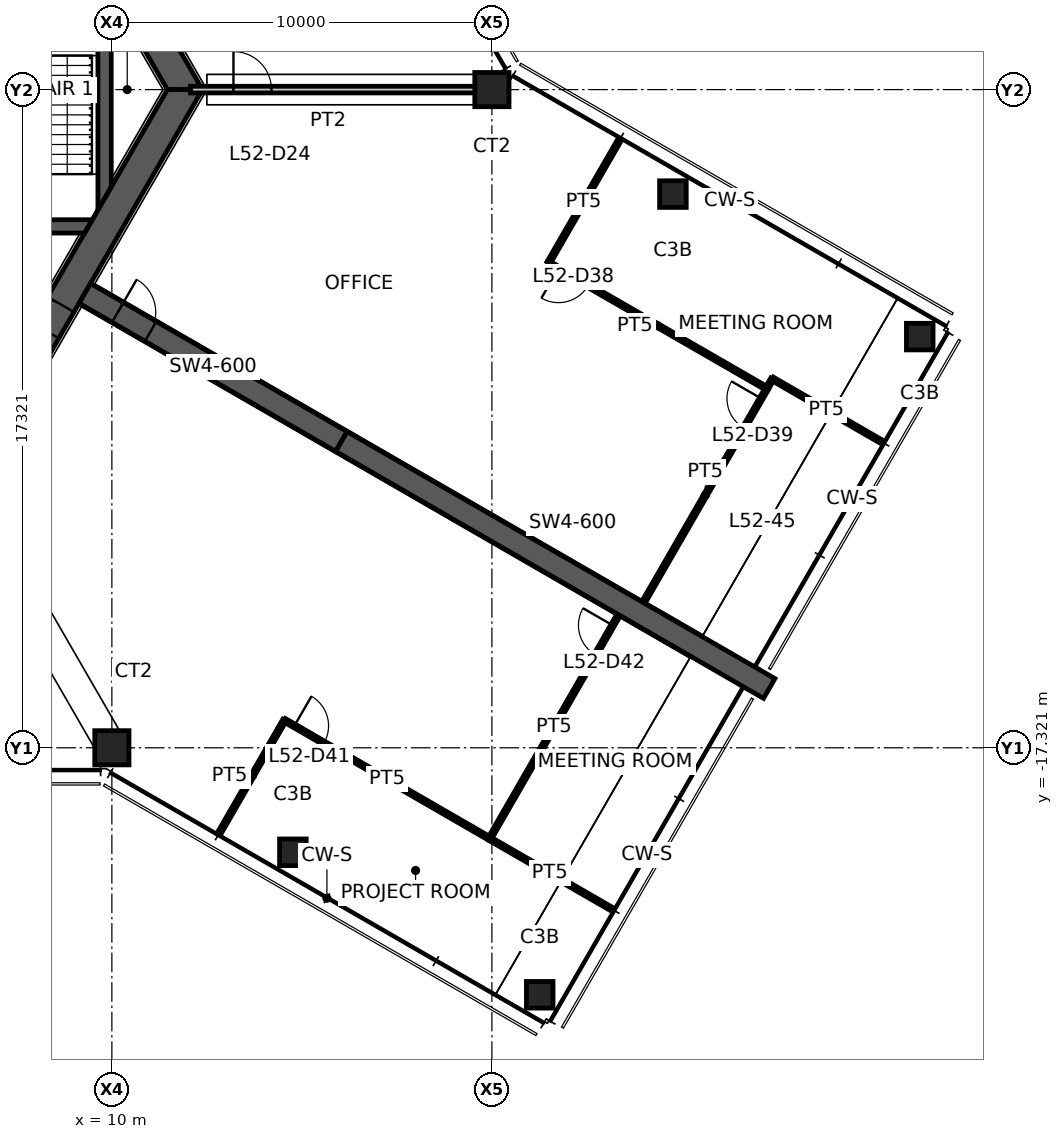
"""IFC4 building model, lengths in metres.
Left out: names, types, materials, properties, quantities, classifications, styles, units other than length and angle.
Written with IfcOpenShell. Run it as: python <this file> out.ifc"""

import sys

from ifc_helpers import new_model, si_unit, direction, frame, frame_2d, origin, origin_2d, place, context, subcontext, project, spatial, polyline, rectangle, hollow_rectangle, outline, extrude, element, fill, save


model = new_model("IFC4")
c1 = context("Model", 3, precision=1e-05, world=origin(), true_north=direction((0.0, 1.0)))
c2 = subcontext(c1, "Body", "Model", "MODEL_VIEW")
j1 = project(units=[si_unit("LENGTHUNIT", "METRE"), si_unit("PLANEANGLEUNIT", "RADIAN")], contexts=[c1])
p1 = place(None, origin())
s1 = spatial("IfcSite", under=j1, at=p1, CompositionType="ELEMENT")
p2 = place(p1, origin())
s2 = spatial("IfcBuilding", under=s1, at=p2, CompositionType="ELEMENT")
p3 = place(p2, frame((0.0, 0.0, 208.3)))
s3 = spatial("IfcBuildingStorey", under=s2, at=p3, CompositionType="ELEMENT", Elevation=208.3)
for number, where, z_axis, x_axis in (
    (1, (20.0, 0.0, 0.0), (0.0, 0.0, 1.0), (1.0, 0.0, 0.0)),
    (2, (10.0, -17.321, 0.0), (0.0, 0.0, 1.0), (1.0, 0.0, 0.0)),
):
    element("IfcColumn", number, at=place(p3, frame(where, z_axis=z_axis, x_axis=x_axis)), inside=s3, PredefinedType="COLUMN", context=c2, shape_type="SweptSolid", body=[
        extrude(hollow_rectangle(XDim=0.9, YDim=0.9, WallThickness=0.09, at=origin_2d()), origin(), (0.0, 0.0, 1.0), 4.5),
    ])
for number, where, z_axis, x_axis in (
    (3, (14.763, -20.071, 0.0), (0.0, 0.0, 1.0), (1.0, 0.0, 0.0)),
    (4, (21.258, -23.821, 0.0), (0.0, 0.0, 1.0), (1.0, 0.0, 0.0)),
    (5, (24.763, -2.75, 0.0), (0.0, 0.0, 1.0), (1.0, 0.0, 0.0)),
    (6, (31.258, -6.5, 0.0), (0.0, 0.0, 1.0), (1.0, 0.0, 0.0)),
):
    element("IfcColumn", number, at=place(p3, frame(where, z_axis=z_axis, x_axis=x_axis)), inside=s3, PredefinedType="COLUMN", context=c2, shape_type="SweptSolid", body=[
        extrude(hollow_rectangle(XDim=0.7, YDim=0.7, WallThickness=0.036, at=origin_2d()), origin(), (0.0, 0.0, 1.0), 4.5),
    ])
p4 = place(p3, frame((11.922, 0.0, 0.0), z_axis=(0.0, 0.0, 1.0), x_axis=(-0.500004296715, 0.866022923061, 0.0)))
e7 = element("IfcWall", 7, at=p4, inside=s3, PredefinedType="SHEAR", context=c2, shape_type="SweptSolid", body=[
    extrude(outline(polyline([(-0.231, -0.4), (5.835, -0.4), (6.635, -0.4), (12.153, -0.4), (11.691, 0.4), (6.635, 0.4), (5.835, 0.4), (0.231, 0.4), (-0.231, -0.4)])), origin(), (0.0, 0.0, 1.0), 4.5),
])
p5 = place(p4, frame((5.835, 0.0, 0.0)))
e8 = element("IfcOpeningElement", 8, at=p5, cuts=e7, PredefinedType="OPENING", context=c2, shape_type="SweptSolid", body=[
    extrude(rectangle(XDim=0.8, YDim=2.1, at=frame_2d((0.4, 1.05))), frame((0.0, 0.41, 0.0), z_axis=(0.0, -1.0, 0.0), x_axis=(1.0, 0.0, 0.0)), (0.0, 0.0, 1.0), 0.82),
])
p6 = place(p3, frame((5.961, -10.325, 0.0), z_axis=(0.0, 0.0, 1.0), x_axis=(0.500004296715, 0.866022923061, 0.0)))
e9 = element("IfcWall", 9, at=p6, inside=s3, PredefinedType="SHEAR", context=c2, shape_type="SweptSolid", body=[
    extrude(outline(polyline([(-0.231, -0.4), (4.594, -0.4), (5.394, -0.4), (12.153, -0.4), (11.691, 0.4), (5.394, 0.4), (4.594, 0.4), (0.231, 0.4), (-0.231, -0.4)])), origin(), (0.0, 0.0, 1.0), 4.5),
])
p7 = place(p6, frame((4.594, 0.0, 0.0)))
e10 = element("IfcOpeningElement", 10, at=p7, cuts=e9, PredefinedType="OPENING", context=c2, shape_type="SweptSolid", body=[
    extrude(rectangle(XDim=0.8, YDim=2.1, at=frame_2d((0.4, 1.05))), frame((0.0, 0.41, 0.0), z_axis=(0.0, -1.0, 0.0), x_axis=(1.0, 0.0, 0.0)), (0.0, 0.0, 1.0), 0.82),
])
p8 = place(p3, frame((9.288, -5.363, 0.0), z_axis=(0.0, 0.0, 1.0), x_axis=(0.866031736626, -0.499989031036, 0.0)))
e11 = element("IfcWall", 11, at=p8, inside=s3, PredefinedType="SHEAR", context=c2, shape_type="SweptSolid", body=[
    extrude(rectangle(XDim=7.796, YDim=0.6, at=frame_2d((3.898, 0.0))), origin(), (0.0, 0.0, 1.0), 4.5),
])
p9 = place(p8, frame((1.0, 0.0, 0.0)))
e12 = element("IfcOpeningElement", 12, at=p9, cuts=e11, PredefinedType="OPENING", context=c2, shape_type="SweptSolid", body=[
    extrude(rectangle(XDim=1.0, YDim=2.1, at=frame_2d((0.5, 1.05))), frame((0.0, 0.31, 0.0), z_axis=(0.0, -1.0, 0.0), x_axis=(1.0, 0.0, 0.0)), (0.0, 0.0, 1.0), 0.62),
])
p10 = place(p3, frame((16.039, -9.26, 0.0), z_axis=(0.0, 0.0, 1.0), x_axis=(0.866024837091, -0.50000098154, 0.0)))
e13 = element("IfcWall", 13, at=p10, inside=s3, PredefinedType="SHEAR", context=c2, shape_type="SweptSolid", body=[
    extrude(rectangle(XDim=13.0, YDim=0.6, at=frame_2d((6.5, 0.0))), origin(), (0.0, 0.0, 1.0), 4.5),
])
p11 = place(p3, frame((1.425, -3.6, 0.0), z_axis=(0.0, 0.0, 1.0), x_axis=(1.0, 0.0, 0.0)))
e14 = element("IfcWall", 14, at=p11, inside=s3, PredefinedType="SHEAR", context=c2, shape_type="SweptSolid", body=[
    extrude(outline(polyline([(0.0, -0.175), (1.075, -0.175), (2.175, -0.175), (7.856, -0.175), (8.058, 0.175), (2.175, 0.175), (1.075, 0.175), (0.0, 0.175), (0.0, -0.175)])), origin(), (0.0, 0.0, 1.0), 4.5),
])
p12 = place(p11, frame((1.075, 0.0, 0.0)))
e15 = element("IfcOpeningElement", 15, at=p12, cuts=e14, PredefinedType="OPENING", context=c2, shape_type="SweptSolid", body=[
    extrude(rectangle(XDim=1.1, YDim=2.1, at=frame_2d((0.55, 1.05))), frame((0.0, 0.185, 0.0), z_axis=(0.0, -1.0, 0.0), x_axis=(1.0, 0.0, 0.0)), (0.0, 0.0, 1.0), 0.37),
])
p13 = place(p3, frame((9.808, -2.862, 0.0), z_axis=(0.0, 0.0, 1.0), x_axis=(0.0, 1.0, 0.0)))
e16 = element("IfcWall", 16, at=p13, inside=s3, PredefinedType="SHEAR", context=c2, shape_type="SweptSolid", body=[
    extrude(outline(polyline([(0.303, -0.175), (5.421, -0.175), (6.028, 0.175), (-0.303, 0.175), (0.303, -0.175)])), origin(), (0.0, 0.0, 1.0), 4.5),
])
p14 = place(p3, frame((12.07, 0.0, 0.0), z_axis=(0.0, 0.0, 1.0), x_axis=(1.0, 0.0, 0.0)))
e17 = element("IfcWall", 17, at=p14, inside=s3, PredefinedType="PARTITIONING", context=c2, shape_type="SweptSolid", body=[
    extrude(rectangle(XDim=7.93, YDim=0.175, at=frame_2d((3.965, 0.0))), origin(), (0.0, 0.0, 1.0), 3.65),
])
p15 = place(p14, frame((1.13, 0.0, 0.0)))
e18 = element("IfcOpeningElement", 18, at=p15, cuts=e17, PredefinedType="OPENING", context=c2, shape_type="SweptSolid", body=[
    extrude(rectangle(XDim=1.0, YDim=2.1, at=frame_2d((0.5, 1.05))), frame((0.0, 0.098, 0.0), z_axis=(0.0, -1.0, 0.0), x_axis=(1.0, 0.0, 0.0)), (0.0, 0.0, 1.0), 0.195),
])
p16 = place(p3, frame((27.384, -7.612, 0.0), z_axis=(0.0, 0.0, 1.0), x_axis=(-0.51497272326, -0.857206564545, 0.0)))
e19 = element("IfcWall", 19, at=p16, inside=s3, PredefinedType="PARTITIONING", context=c2, shape_type="SweptSolid", body=[
    extrude(rectangle(XDim=0.301, YDim=0.1, at=frame_2d((0.15, 0.0))), origin(), (0.0, 0.0, 1.0), 3.55),
])
p17 = place(p3, frame((30.216, -9.246, 0.0), z_axis=(0.0, 0.0, 1.0), x_axis=(-0.866098561983, 0.499873264869, 0.0)))
e20 = element("IfcWall", 20, at=p17, inside=s3, PredefinedType="PARTITIONING", context=c2, shape_type="SweptSolid", body=[
    extrude(rectangle(XDim=3.27, YDim=0.1, at=frame_2d((1.635, 0.0))), origin(), (0.0, 0.0, 1.0), 3.55),
])
p18 = place(p3, frame((21.492, -4.557, 0.0), z_axis=(0.0, 0.0, 1.0), x_axis=(0.500013413428, 0.866017659399, 0.0)))
e21 = element("IfcWall", 21, at=p18, inside=s3, PredefinedType="PARTITIONING", context=c2, shape_type="SweptSolid", body=[
    extrude(rectangle(XDim=3.68, YDim=0.1, at=frame_2d((1.84, 0.0))), origin(), (0.0, 0.0, 1.0), 3.55),
])
p19 = place(p3, frame((27.235, -7.868, 0.0), z_axis=(0.0, 0.0, 1.0), x_axis=(-0.866328411177, 0.499474808161, 0.0)))
e22 = element("IfcWall", 22, at=p19, inside=s3, PredefinedType="PARTITIONING", context=c2, shape_type="SweptSolid", body=[
    extrude(rectangle(XDim=6.629, YDim=0.1, at=frame_2d((3.314, 0.0))), origin(), (0.0, 0.0, 1.0), 3.55),
])
p20 = place(p19, frame((5.429, 0.0, 0.0)))
e23 = element("IfcOpeningElement", 23, at=p20, cuts=e22, PredefinedType="OPENING", context=c2, shape_type="SweptSolid", body=[
    extrude(rectangle(XDim=0.9, YDim=2.1, at=frame_2d((0.45, 1.05))), frame((0.0, 0.06, 0.0), z_axis=(0.0, -1.0, 0.0), x_axis=(1.0, 0.0, 0.0)), (0.0, 0.0, 1.0), 0.12),
])
p21 = place(p3, frame((23.993, -13.483, 0.0), z_axis=(0.0, 0.0, 1.0), x_axis=(0.499998413156, 0.866026319947, 0.0)))
e24 = element("IfcWall", 24, at=p21, inside=s3, PredefinedType="PARTITIONING", context=c2, shape_type="SweptSolid", body=[
    extrude(rectangle(XDim=6.484, YDim=0.1, at=frame_2d((3.242, 0.0))), origin(), (0.0, 0.0, 1.0), 3.55),
])
p22 = place(p21, frame((5.284, 0.0, 0.0)))
e25 = element("IfcOpeningElement", 25, at=p22, cuts=e24, PredefinedType="OPENING", context=c2, shape_type="SweptSolid", body=[
    extrude(rectangle(XDim=0.9, YDim=2.1, at=frame_2d((0.45, 1.05))), frame((0.0, 0.06, 0.0), z_axis=(0.0, -1.0, 0.0), x_axis=(1.0, 0.0, 0.0)), (0.0, 0.0, 1.0), 0.12),
])
p23 = place(p3, frame((19.933, -19.707, 0.0), z_axis=(0.0, 0.0, 1.0), x_axis=(0.866006363297, -0.500032977642, 0.0)))
e26 = element("IfcWall", 26, at=p23, inside=s3, PredefinedType="PARTITIONING", context=c2, shape_type="SweptSolid", body=[
    extrude(rectangle(XDim=3.675, YDim=0.1, at=frame_2d((1.837, 0.0))), origin(), (0.0, 0.0, 1.0), 3.55),
])
p24 = place(p3, frame((12.857, -19.513, 0.0), z_axis=(0.0, 0.0, 1.0), x_axis=(0.500019282102, 0.866014270972, 0.0)))
e27 = element("IfcWall", 27, at=p24, inside=s3, PredefinedType="PARTITIONING", context=c2, shape_type="SweptSolid", body=[
    extrude(rectangle(XDim=3.37, YDim=0.1, at=frame_2d((1.685, 0.0))), origin(), (0.0, 0.0, 1.0), 3.55),
])
p25 = place(p3, frame((14.542, -16.594, 0.0), z_axis=(0.0, 0.0, 1.0), x_axis=(0.866024496556, -0.500001571362, 0.0)))
e28 = element("IfcWall", 28, at=p25, inside=s3, PredefinedType="PARTITIONING", context=c2, shape_type="SweptSolid", body=[
    extrude(rectangle(XDim=6.234, YDim=0.1, at=frame_2d((3.117, 0.0))), origin(), (0.0, 0.0, 1.0), 3.55),
])
p26 = place(p25, frame((0.3, 0.0, 0.0)))
e29 = element("IfcOpeningElement", 29, at=p26, cuts=e28, PredefinedType="OPENING", context=c2, shape_type="SweptSolid", body=[
    extrude(rectangle(XDim=0.9, YDim=2.1, at=frame_2d((0.45, 1.05))), frame((0.0, 0.06, 0.0), z_axis=(0.0, -1.0, 0.0), x_axis=(1.0, 0.0, 0.0)), (0.0, 0.0, 1.0), 0.12),
])
p27 = place(p3, frame((19.941, -19.711, 0.0), z_axis=(0.0, 0.0, 1.0), x_axis=(0.499420036565, 0.866359987001, 0.0)))
e30 = element("IfcWall", 30, at=p27, inside=s3, PredefinedType="PARTITIONING", context=c2, shape_type="SweptSolid", body=[
    extrude(rectangle(XDim=6.78, YDim=0.1, at=frame_2d((3.39, 0.0))), origin(), (0.0, 0.0, 1.0), 3.55),
])
p28 = place(p27, frame((5.58, 0.0, 0.0)))
e31 = element("IfcOpeningElement", 31, at=p28, cuts=e30, PredefinedType="OPENING", context=c2, shape_type="SweptSolid", body=[
    extrude(rectangle(XDim=0.9, YDim=2.1, at=frame_2d((0.45, 1.05))), frame((0.0, 0.06, 0.0), z_axis=(0.0, -1.0, 0.0), x_axis=(1.0, 0.0, 0.0)), (0.0, 0.0, 1.0), 0.12),
])
p29 = place(p7, origin())
e32 = element("IfcDoor", 32, at=p29, inside=s3, OperationType="SINGLE_SWING_LEFT", PredefinedType="DOOR", context=c2, shape_type="SweptSolid", body=[
    extrude(rectangle(XDim=0.8, YDim=2.1, at=frame_2d((0.4, 1.05))), frame((0.0, 0.025, 0.0), z_axis=(0.0, -1.0, 0.0), x_axis=(1.0, 0.0, 0.0)), (0.0, 0.0, 1.0), 0.05),
])
fill(e10, e32)
p30 = place(p9, origin())
e33 = element("IfcDoor", 33, at=p30, inside=s3, OperationType="SINGLE_SWING_LEFT", PredefinedType="DOOR", context=c2, shape_type="SweptSolid", body=[
    extrude(rectangle(XDim=1.0, YDim=2.1, at=frame_2d((0.5, 1.05))), frame((0.0, 0.025, 0.0), z_axis=(0.0, -1.0, 0.0), x_axis=(1.0, 0.0, 0.0)), (0.0, 0.0, 1.0), 0.05),
])
fill(e12, e33)
p31 = place(p15, origin())
e34 = element("IfcDoor", 34, at=p31, inside=s3, OperationType="SINGLE_SWING_LEFT", PredefinedType="DOOR", context=c2, shape_type="SweptSolid", body=[
    extrude(rectangle(XDim=1.0, YDim=2.1, at=frame_2d((0.5, 1.05))), frame((0.0, 0.025, 0.0), z_axis=(0.0, -1.0, 0.0), x_axis=(1.0, 0.0, 0.0)), (0.0, 0.0, 1.0), 0.05),
])
fill(e18, e34)
p32 = place(p20, origin())
e35 = element("IfcDoor", 35, at=p32, inside=s3, OperationType="SINGLE_SWING_RIGHT", PredefinedType="DOOR", context=c2, shape_type="SweptSolid", body=[
    extrude(rectangle(XDim=0.9, YDim=2.1, at=frame_2d((0.45, 1.05))), frame((0.0, 0.025, 0.0), z_axis=(0.0, -1.0, 0.0), x_axis=(1.0, 0.0, 0.0)), (0.0, 0.0, 1.0), 0.05),
])
fill(e23, e35)
p33 = place(p22, origin())
e36 = element("IfcDoor", 36, at=p33, inside=s3, OperationType="SINGLE_SWING_RIGHT", PredefinedType="DOOR", context=c2, shape_type="SweptSolid", body=[
    extrude(rectangle(XDim=0.9, YDim=2.1, at=frame_2d((0.45, 1.05))), frame((0.0, 0.025, 0.0), z_axis=(0.0, -1.0, 0.0), x_axis=(1.0, 0.0, 0.0)), (0.0, 0.0, 1.0), 0.05),
])
fill(e25, e36)
p34 = place(p26, origin())
e37 = element("IfcDoor", 37, at=p34, inside=s3, OperationType="SINGLE_SWING_LEFT", PredefinedType="DOOR", context=c2, shape_type="SweptSolid", body=[
    extrude(rectangle(XDim=0.9, YDim=2.1, at=frame_2d((0.45, 1.05))), frame((0.0, 0.025, 0.0), z_axis=(0.0, -1.0, 0.0), x_axis=(1.0, 0.0, 0.0)), (0.0, 0.0, 1.0), 0.05),
])
fill(e29, e37)
p35 = place(p28, origin())
e38 = element("IfcDoor", 38, at=p35, inside=s3, OperationType="SINGLE_SWING_RIGHT", PredefinedType="DOOR", context=c2, shape_type="SweptSolid", body=[
    extrude(rectangle(XDim=0.9, YDim=2.1, at=frame_2d((0.45, 1.05))), frame((0.0, 0.025, 0.0), z_axis=(0.0, -1.0, 0.0), x_axis=(1.0, 0.0, 0.0)), (0.0, 0.0, 1.0), 0.05),
])
fill(e31, e38)
save(model, sys.argv[1])
